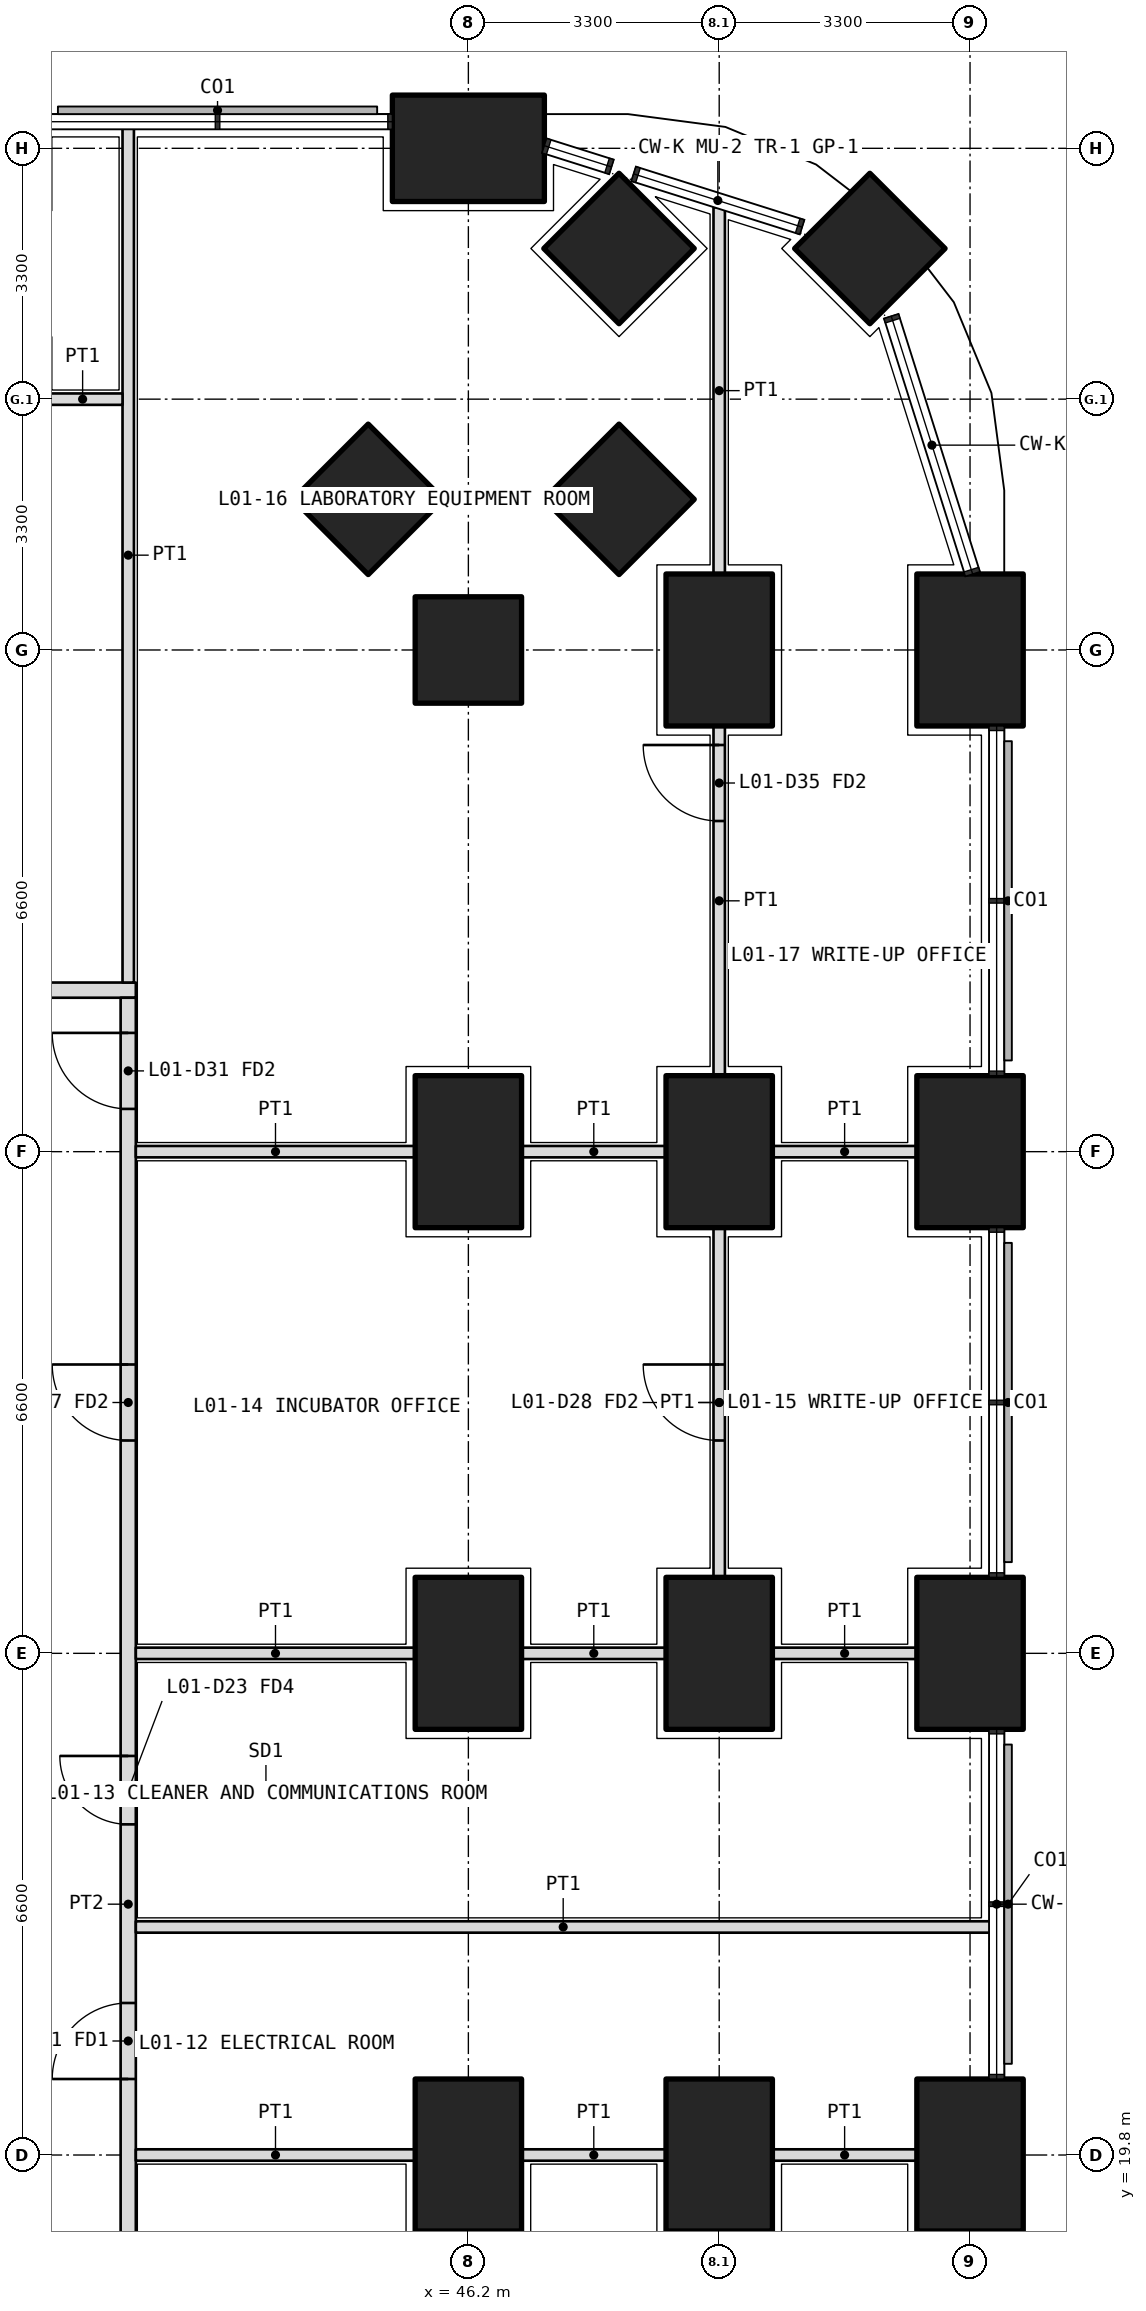
"""IFC4 building model, lengths in metres.
Left out: names, types, materials, properties, quantities, classifications, styles, units other than length and angle.
Written with IfcOpenShell. Run it as: python <this file> out.ifc"""

import sys

from ifc_helpers import new_model, si_unit, direction, frame, frame_2d, origin, origin_2d, place, context, subcontext, project, spatial, rectangle, extrude, element, fill, save


model = new_model("IFC4")
c1 = context("Model", 3, precision=1e-05, world=origin(), true_north=direction((0.0, 1.0)))
c2 = subcontext(c1, "Body", "Model", "MODEL_VIEW")
j1 = project(units=[si_unit("LENGTHUNIT", "METRE"), si_unit("PLANEANGLEUNIT", "RADIAN")], contexts=[c1])
p1 = place(None, origin())
s1 = spatial("IfcSite", under=j1, at=p1, CompositionType="ELEMENT")
p2 = place(p1, origin())
s2 = spatial("IfcBuilding", under=s1, at=p2, CompositionType="ELEMENT")
p3 = place(p2, frame((0.0, 0.0, 7.2)))
s3 = spatial("IfcBuildingStorey", under=s2, at=p3, CompositionType="ELEMENT", Elevation=7.2)
p4 = place(p3, frame((51.482, 44.882, 0.0), z_axis=(0.0, 0.0, 1.0), x_axis=(0.707106781187, 0.707106781187, 0.0)))
e1 = element("IfcColumn", 1, at=p4, inside=s3, PredefinedType="COLUMN", context=c2, shape_type="SweptSolid", body=[
    extrude(rectangle(XDim=1.4, YDim=1.4, at=origin_2d()), origin(), (0.0, 0.0, 1.0), 5.4),
])
for number, where, z_axis, x_axis in (
    (2, (52.8, 19.8, 0.0), (0.0, 0.0, 1.0), (0.0, 1.0, 0.0)),
    (3, (52.8, 26.4, 0.0), (0.0, 0.0, 1.0), (0.0, 1.0, 0.0)),
    (4, (52.8, 33.0, 0.0), (0.0, 0.0, 1.0), (0.0, 1.0, 0.0)),
    (5, (52.8, 39.6, 0.0), (0.0, 0.0, 1.0), (0.0, 1.0, 0.0)),
    (6, (46.2, 46.2, 0.0), (0.0, 0.0, 1.0), (1.0, 0.0, 0.0)),
):
    element("IfcColumn", number, at=place(p3, frame(where, z_axis=z_axis, x_axis=x_axis)), inside=s3, PredefinedType="COLUMN", context=c2, shape_type="SweptSolid", body=[
        extrude(rectangle(XDim=2.0, YDim=1.4, at=origin_2d()), origin(), (0.0, 0.0, 1.0), 5.4),
    ])
for number, where, z_axis, x_axis in (
    (7, (46.2, 39.6, 0.0), (0.0, 0.0, 1.0), (1.0, 0.0, 0.0)),
    (8, (48.182, 44.882, 0.0), (0.0, 0.0, 1.0), (0.707, 0.707, 0.0)),
):
    element("IfcColumn", number, at=place(p3, frame(where, z_axis=z_axis, x_axis=x_axis)), inside=s3, PredefinedType="COLUMN", context=c2, shape_type="SweptSolid", body=[
        extrude(rectangle(XDim=1.4, YDim=1.4, at=origin_2d()), origin(), (0.0, 0.0, 1.0), 5.4),
    ])
for number, where, z_axis, x_axis in (
    (9, (49.5, 19.8, 0.0), (0.0, 0.0, 1.0), (0.0, 1.0, 0.0)),
    (10, (49.5, 26.4, 0.0), (0.0, 0.0, 1.0), (0.0, 1.0, 0.0)),
    (11, (49.5, 33.0, 0.0), (0.0, 0.0, 1.0), (0.0, 1.0, 0.0)),
    (12, (49.5, 39.6, 0.0), (0.0, 0.0, 1.0), (0.0, 1.0, 0.0)),
):
    element("IfcColumn", number, at=place(p3, frame(where, z_axis=z_axis, x_axis=x_axis)), inside=s3, PredefinedType="COLUMN", context=c2, shape_type="SweptSolid", body=[
        extrude(rectangle(XDim=2.0, YDim=1.4, at=origin_2d()), origin(), (0.0, 0.0, 1.0), 5.4),
    ])
for number, where, z_axis, x_axis in (
    (13, (48.182, 41.582, 0.0), (0.0, 0.0, 1.0), (0.707, 0.707, 0.0)),
    (14, (44.882, 41.582, 0.0), (0.0, 0.0, 1.0), (0.707, 0.707, 0.0)),
):
    element("IfcColumn", number, at=place(p3, frame(where, z_axis=z_axis, x_axis=x_axis)), inside=s3, PredefinedType="COLUMN", context=c2, shape_type="SweptSolid", body=[
        extrude(rectangle(XDim=1.4, YDim=1.4, at=origin_2d()), origin(), (0.0, 0.0, 1.0), 5.4),
    ])
for number, where, z_axis, x_axis in (
    (15, (46.2, 19.8, 0.0), (0.0, 0.0, 1.0), (0.0, 1.0, 0.0)),
    (16, (46.2, 26.4, 0.0), (0.0, 0.0, 1.0), (0.0, 1.0, 0.0)),
    (17, (46.2, 33.0, 0.0), (0.0, 0.0, 1.0), (0.0, 1.0, 0.0)),
):
    element("IfcColumn", number, at=place(p3, frame(where, z_axis=z_axis, x_axis=x_axis)), inside=s3, PredefinedType="COLUMN", context=c2, shape_type="SweptSolid", body=[
        extrude(rectangle(XDim=2.0, YDim=1.4, at=origin_2d()), origin(), (0.0, 0.0, 1.0), 5.4),
    ])
p5 = place(p3, frame((10.975, 35.125, 0.0), z_axis=(0.0, 0.0, 1.0), x_axis=(1.0, 0.0, 0.0)))
e18 = element("IfcWall", 18, at=p5, inside=s3, PredefinedType="PARTITIONING", context=c2, shape_type="SweptSolid", body=[
    extrude(rectangle(XDim=30.85, YDim=0.2, at=frame_2d((15.425, 0.0))), origin(), (0.0, 0.0, 1.0), 4.05),
])
p6 = place(p5, frame((3.962, 0.0, 0.0)))
e19 = element("IfcOpeningElement", 19, at=p6, cuts=e18, PredefinedType="OPENING", context=c2, shape_type="SweptSolid", body=[
    extrude(rectangle(XDim=1.0, YDim=2.1, at=frame_2d((0.5, 1.05))), frame((0.0, 0.11, 0.0), z_axis=(0.0, -1.0, 0.0), x_axis=(1.0, 0.0, 0.0)), (0.0, 0.0, 1.0), 0.22),
])
p7 = place(p5, frame((14.825, 0.0, 0.0)))
e20 = element("IfcOpeningElement", 20, at=p7, cuts=e18, PredefinedType="OPENING", context=c2, shape_type="SweptSolid", body=[
    extrude(rectangle(XDim=1.2, YDim=2.1, at=frame_2d((0.6, 1.05))), frame((0.0, 0.11, 0.0), z_axis=(0.0, -1.0, 0.0), x_axis=(1.0, 0.0, 0.0)), (0.0, 0.0, 1.0), 0.22),
])
p8 = place(p5, frame((25.887, 0.0, 0.0)))
e21 = element("IfcOpeningElement", 21, at=p8, cuts=e18, PredefinedType="OPENING", context=c2, shape_type="SweptSolid", body=[
    extrude(rectangle(XDim=1.0, YDim=2.1, at=frame_2d((0.5, 1.05))), frame((0.0, 0.11, 0.0), z_axis=(0.0, -1.0, 0.0), x_axis=(1.0, 0.0, 0.0)), (0.0, 0.0, 1.0), 0.22),
])
p9 = place(p3, frame((41.725, 11.175, 0.0), z_axis=(0.0, 0.0, 1.0), x_axis=(0.0, 1.0, 0.0)))
e22 = element("IfcWall", 22, at=p9, inside=s3, PredefinedType="PARTITIONING", context=c2, shape_type="SweptSolid", body=[
    extrude(rectangle(XDim=23.85, YDim=0.2, at=frame_2d((11.925, 0.0))), origin(), (0.0, 0.0, 1.0), 4.05),
])
p10 = place(p9, frame((3.663, 0.0, 0.0)))
e23 = element("IfcOpeningElement", 23, at=p10, cuts=e22, PredefinedType="OPENING", context=c2, shape_type="SweptSolid", body=[
    extrude(rectangle(XDim=1.2, YDim=2.1, at=frame_2d((0.6, 1.05))), frame((0.0, 0.11, 0.0), z_axis=(0.0, -1.0, 0.0), x_axis=(1.0, 0.0, 0.0)), (0.0, 0.0, 1.0), 0.22),
])
p11 = place(p9, frame((9.625, 0.0, 0.0)))
e24 = element("IfcOpeningElement", 24, at=p11, cuts=e22, PredefinedType="OPENING", context=c2, shape_type="SweptSolid", body=[
    extrude(rectangle(XDim=1.0, YDim=2.1, at=frame_2d((0.5, 1.05))), frame((0.0, 0.11, 0.0), z_axis=(0.0, -1.0, 0.0), x_axis=(1.0, 0.0, 0.0)), (0.0, 0.0, 1.0), 0.22),
])
p12 = place(p9, frame((12.975, 0.0, 0.0)))
e25 = element("IfcOpeningElement", 25, at=p12, cuts=e22, PredefinedType="OPENING", context=c2, shape_type="SweptSolid", body=[
    extrude(rectangle(XDim=0.9, YDim=2.1, at=frame_2d((0.45, 1.05))), frame((0.0, 0.11, 0.0), z_axis=(0.0, -1.0, 0.0), x_axis=(1.0, 0.0, 0.0)), (0.0, 0.0, 1.0), 0.22),
])
p13 = place(p9, frame((18.025, 0.0, 0.0)))
e26 = element("IfcOpeningElement", 26, at=p13, cuts=e22, PredefinedType="OPENING", context=c2, shape_type="SweptSolid", body=[
    extrude(rectangle(XDim=1.0, YDim=2.1, at=frame_2d((0.5, 1.05))), frame((0.0, 0.11, 0.0), z_axis=(0.0, -1.0, 0.0), x_axis=(1.0, 0.0, 0.0)), (0.0, 0.0, 1.0), 0.22),
])
p14 = place(p9, frame((22.387, 0.0, 0.0)))
e27 = element("IfcOpeningElement", 27, at=p14, cuts=e22, PredefinedType="OPENING", context=c2, shape_type="SweptSolid", body=[
    extrude(rectangle(XDim=1.0, YDim=2.1, at=frame_2d((0.5, 1.05))), frame((0.0, 0.11, 0.0), z_axis=(0.0, -1.0, 0.0), x_axis=(1.0, 0.0, 0.0)), (0.0, 0.0, 1.0), 0.22),
])
p15 = place(p3, frame((41.725, 46.47, 0.0), z_axis=(0.0, 0.0, 1.0), x_axis=(0.0, -1.0, 0.0)))
e28 = element("IfcWall", 28, at=p15, inside=s3, PredefinedType="PARTITIONING", context=c2, shape_type="SweptSolid", body=[
    extrude(rectangle(XDim=11.245, YDim=0.15, at=frame_2d((5.623, 0.0))), origin(), (0.0, 0.0, 1.0), 3.9),
])
p16 = place(p3, frame((49.5, 27.4, 0.0), z_axis=(0.0, 0.0, 1.0), x_axis=(0.0, 1.0, 0.0)))
e29 = element("IfcWall", 29, at=p16, inside=s3, PredefinedType="PARTITIONING", context=c2, shape_type="SweptSolid", body=[
    extrude(rectangle(XDim=4.6, YDim=0.15, at=frame_2d((2.3, 0.0))), origin(), (0.0, 0.0, 1.0), 5.1),
])
p17 = place(p16, frame((1.8, 0.0, 0.0)))
e30 = element("IfcOpeningElement", 30, at=p17, cuts=e29, PredefinedType="OPENING", context=c2, shape_type="SweptSolid", body=[
    extrude(rectangle(XDim=1.0, YDim=2.1, at=frame_2d((0.5, 1.05))), frame((0.0, 0.085, 0.0), z_axis=(0.0, -1.0, 0.0), x_axis=(1.0, 0.0, 0.0)), (0.0, 0.0, 1.0), 0.17),
])
p18 = place(p3, frame((49.5, 34.0, 0.0), z_axis=(0.0, 0.0, 1.0), x_axis=(0.0, 1.0, 0.0)))
e31 = element("IfcWall", 31, at=p18, inside=s3, PredefinedType="PARTITIONING", context=c2, shape_type="SweptSolid", body=[
    extrude(rectangle(XDim=4.6, YDim=0.15, at=frame_2d((2.3, 0.0))), origin(), (0.0, 0.0, 1.0), 5.1),
])
p19 = place(p18, frame((3.35, 0.0, 0.0)))
e32 = element("IfcOpeningElement", 32, at=p19, cuts=e31, PredefinedType="OPENING", context=c2, shape_type="SweptSolid", body=[
    extrude(rectangle(XDim=1.0, YDim=2.1, at=frame_2d((0.5, 1.05))), frame((0.0, 0.085, 0.0), z_axis=(0.0, -1.0, 0.0), x_axis=(1.0, 0.0, 0.0)), (0.0, 0.0, 1.0), 0.17),
])
p20 = place(p3, frame((49.5, 40.6, 0.0), z_axis=(0.0, 0.0, 1.0), x_axis=(0.0, 1.0, 0.0)))
e33 = element("IfcWall", 33, at=p20, inside=s3, PredefinedType="PARTITIONING", context=c2, shape_type="SweptSolid", body=[
    extrude(rectangle(XDim=4.824, YDim=0.15, at=frame_2d((2.412, 0.0))), origin(), (0.0, 0.0, 1.0), 3.9),
])
p21 = place(p3, frame((53.07, 22.8, 0.0), z_axis=(0.0, 0.0, 1.0), x_axis=(-1.0, 0.0, 0.0)))
e34 = element("IfcWall", 34, at=p21, inside=s3, PredefinedType="PARTITIONING", context=c2, shape_type="SweptSolid", body=[
    extrude(rectangle(XDim=11.245, YDim=0.15, at=frame_2d((5.623, 0.0))), origin(), (0.0, 0.0, 1.0), 3.9),
])
for number, where, z_axis, x_axis in (
    (35, (52.1, 26.4, 0.0), (0.0, 0.0, 1.0), (-1.0, 0.0, 0.0)),
    (36, (48.8, 26.4, 0.0), (0.0, 0.0, 1.0), (-1.0, 0.0, 0.0)),
):
    element("IfcWall", number, at=place(p3, frame(where, z_axis=z_axis, x_axis=x_axis)), inside=s3, PredefinedType="PARTITIONING", context=c2, shape_type="SweptSolid", body=[
        extrude(rectangle(XDim=1.9, YDim=0.15, at=frame_2d((0.95, 0.0))), origin(), (0.0, 0.0, 1.0), 4.05),
    ])
p22 = place(p3, frame((45.5, 26.4, 0.0), z_axis=(0.0, 0.0, 1.0), x_axis=(-1.0, 0.0, 0.0)))
e37 = element("IfcWall", 37, at=p22, inside=s3, PredefinedType="PARTITIONING", context=c2, shape_type="SweptSolid", body=[
    extrude(rectangle(XDim=3.675, YDim=0.15, at=frame_2d((1.837, 0.0))), origin(), (0.0, 0.0, 1.0), 4.05),
])
for number, where, z_axis, x_axis in (
    (38, (52.1, 19.8, 0.0), (0.0, 0.0, 1.0), (-1.0, 0.0, 0.0)),
    (39, (48.8, 19.8, 0.0), (0.0, 0.0, 1.0), (-1.0, 0.0, 0.0)),
):
    element("IfcWall", number, at=place(p3, frame(where, z_axis=z_axis, x_axis=x_axis)), inside=s3, PredefinedType="PARTITIONING", context=c2, shape_type="SweptSolid", body=[
        extrude(rectangle(XDim=1.9, YDim=0.15, at=frame_2d((0.95, 0.0))), origin(), (0.0, 0.0, 1.0), 4.05),
    ])
p23 = place(p3, frame((45.5, 19.8, 0.0), z_axis=(0.0, 0.0, 1.0), x_axis=(-1.0, 0.0, 0.0)))
e40 = element("IfcWall", 40, at=p23, inside=s3, PredefinedType="PARTITIONING", context=c2, shape_type="SweptSolid", body=[
    extrude(rectangle(XDim=3.675, YDim=0.15, at=frame_2d((1.837, 0.0))), origin(), (0.0, 0.0, 1.0), 4.05),
])
for number, where, z_axis, x_axis in (
    (41, (52.1, 33.0, 0.0), (0.0, 0.0, 1.0), (-1.0, 0.0, 0.0)),
    (42, (48.8, 33.0, 0.0), (0.0, 0.0, 1.0), (-1.0, 0.0, 0.0)),
):
    element("IfcWall", number, at=place(p3, frame(where, z_axis=z_axis, x_axis=x_axis)), inside=s3, PredefinedType="PARTITIONING", context=c2, shape_type="SweptSolid", body=[
        extrude(rectangle(XDim=1.9, YDim=0.15, at=frame_2d((0.95, 0.0))), origin(), (0.0, 0.0, 1.0), 4.05),
    ])
p24 = place(p3, frame((45.5, 33.0, 0.0), z_axis=(0.0, 0.0, 1.0), x_axis=(-1.0, 0.0, 0.0)))
e43 = element("IfcWall", 43, at=p24, inside=s3, PredefinedType="PARTITIONING", context=c2, shape_type="SweptSolid", body=[
    extrude(rectangle(XDim=3.675, YDim=0.15, at=frame_2d((1.837, 0.0))), origin(), (0.0, 0.0, 1.0), 4.05),
])
p25 = place(p3, frame((41.65, 42.9, 0.0), z_axis=(0.0, 0.0, 1.0), x_axis=(-1.0, 0.0, 0.0)))
e44 = element("IfcWall", 44, at=p25, inside=s3, PredefinedType="PARTITIONING", context=c2, shape_type="SweptSolid", body=[
    extrude(rectangle(XDim=1.05, YDim=0.15, at=frame_2d((0.525, 0.0))), origin(), (0.0, 0.0, 1.0), 5.1),
])
p26 = place(p11, origin())
e45 = element("IfcDoor", 45, at=p26, inside=s3, OperationType="SINGLE_SWING_LEFT", PredefinedType="DOOR", context=c2, shape_type="SweptSolid", body=[
    extrude(rectangle(XDim=1.0, YDim=2.1, at=frame_2d((0.5, 1.05))), frame((0.0, 0.025, 0.0), z_axis=(0.0, -1.0, 0.0), x_axis=(1.0, 0.0, 0.0)), (0.0, 0.0, 1.0), 0.05),
])
fill(e24, e45)
p27 = place(p12, origin())
e46 = element("IfcDoor", 46, at=p27, inside=s3, OperationType="SINGLE_SWING_RIGHT", PredefinedType="DOOR", context=c2, shape_type="SweptSolid", body=[
    extrude(rectangle(XDim=0.9, YDim=2.1, at=frame_2d((0.45, 1.05))), frame((0.0, 0.025, 0.0), z_axis=(0.0, -1.0, 0.0), x_axis=(1.0, 0.0, 0.0)), (0.0, 0.0, 1.0), 0.05),
])
fill(e25, e46)
p28 = place(p13, origin())
e47 = element("IfcDoor", 47, at=p28, inside=s3, OperationType="SINGLE_SWING_RIGHT", PredefinedType="DOOR", context=c2, shape_type="SweptSolid", body=[
    extrude(rectangle(XDim=1.0, YDim=2.1, at=frame_2d((0.5, 1.05))), frame((0.0, 0.025, 0.0), z_axis=(0.0, -1.0, 0.0), x_axis=(1.0, 0.0, 0.0)), (0.0, 0.0, 1.0), 0.05),
])
fill(e26, e47)
p29 = place(p17, origin())
e48 = element("IfcDoor", 48, at=p29, inside=s3, OperationType="SINGLE_SWING_RIGHT", PredefinedType="DOOR", context=c2, shape_type="SweptSolid", body=[
    extrude(rectangle(XDim=1.0, YDim=2.1, at=frame_2d((0.5, 1.05))), frame((0.0, 0.025, 0.0), z_axis=(0.0, -1.0, 0.0), x_axis=(1.0, 0.0, 0.0)), (0.0, 0.0, 1.0), 0.05),
])
fill(e30, e48)
p30 = place(p14, origin())
e49 = element("IfcDoor", 49, at=p30, inside=s3, OperationType="SINGLE_SWING_RIGHT", PredefinedType="DOOR", context=c2, shape_type="SweptSolid", body=[
    extrude(rectangle(XDim=1.0, YDim=2.1, at=frame_2d((0.5, 1.05))), frame((0.0, 0.025, 0.0), z_axis=(0.0, -1.0, 0.0), x_axis=(1.0, 0.0, 0.0)), (0.0, 0.0, 1.0), 0.05),
])
fill(e27, e49)
p31 = place(p19, origin())
e50 = element("IfcDoor", 50, at=p31, inside=s3, OperationType="SINGLE_SWING_RIGHT", PredefinedType="DOOR", context=c2, shape_type="SweptSolid", body=[
    extrude(rectangle(XDim=1.0, YDim=2.1, at=frame_2d((0.5, 1.05))), frame((0.0, 0.025, 0.0), z_axis=(0.0, -1.0, 0.0), x_axis=(1.0, 0.0, 0.0)), (0.0, 0.0, 1.0), 0.05),
])
fill(e32, e50)
save(model, sys.argv[1])
